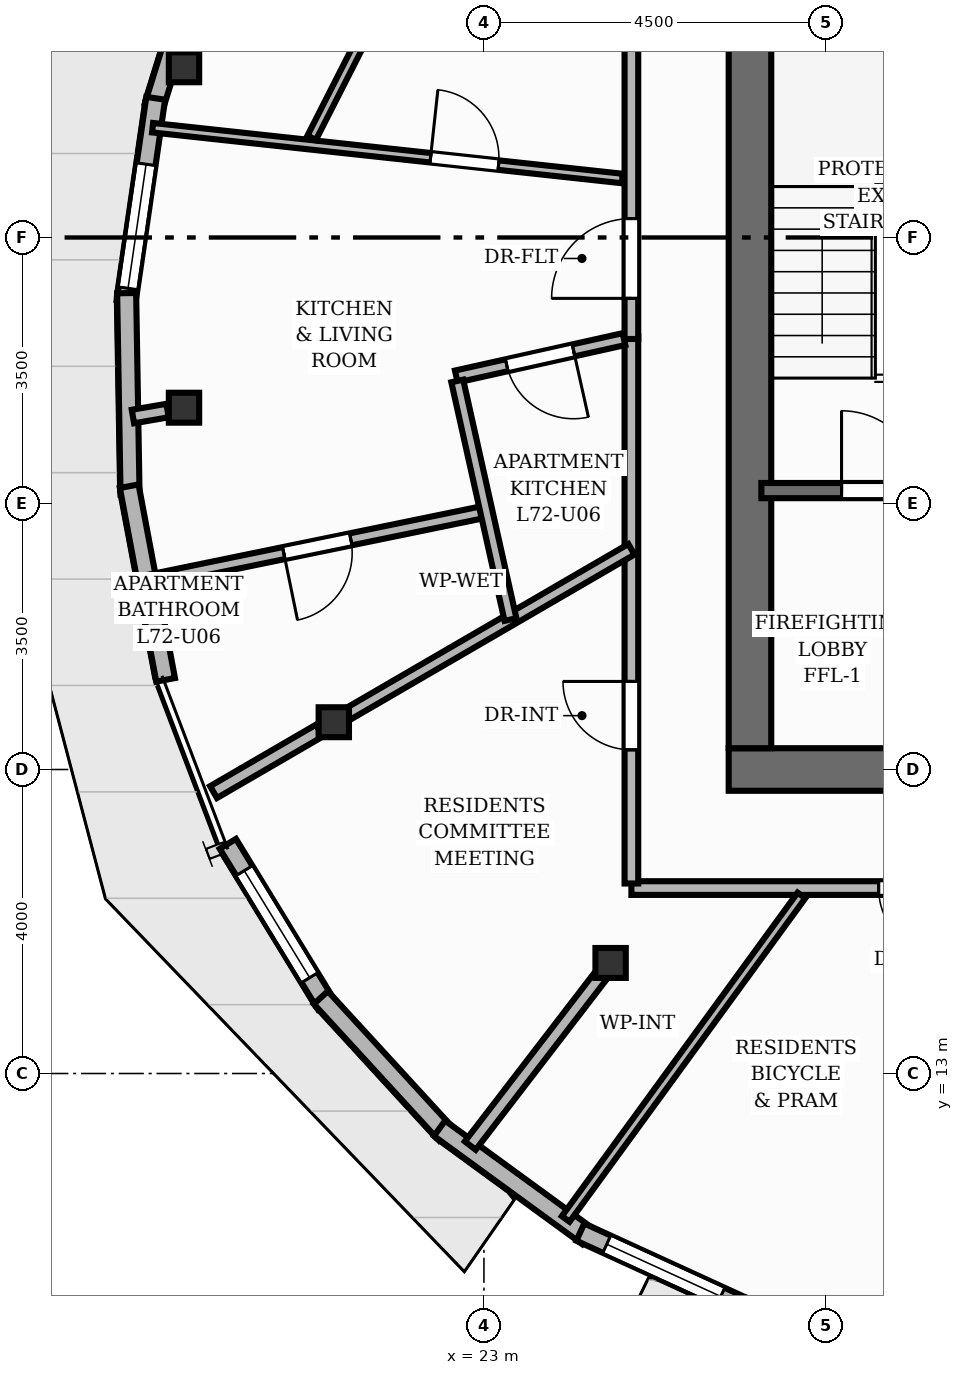
"""IFC4 building model, lengths in metres.
Left out: names, types, materials, properties, quantities, classifications, styles, units other than length and angle.
Written with IfcOpenShell. Run it as: python <this file> out.ifc"""

import sys

from ifc_helpers import new_model, si_unit, direction, frame, frame_2d, origin, origin_2d, place, context, subcontext, project, spatial, rectangle, i_section, extrude, element, fill, save


model = new_model("IFC4")
c1 = context("Model", 3, precision=1e-05, world=origin(), true_north=direction((0.0, 1.0)))
c2 = subcontext(c1, "Body", "Model", "MODEL_VIEW")
j1 = project(units=[si_unit("LENGTHUNIT", "METRE"), si_unit("PLANEANGLEUNIT", "RADIAN")], contexts=[c1])
p1 = place(None, origin())
s1 = spatial("IfcSite", under=j1, at=p1, CompositionType="ELEMENT")
p2 = place(p1, origin())
s2 = spatial("IfcBuilding", under=s1, at=p2, CompositionType="ELEMENT")
p3 = place(p2, frame((0.0, 0.0, 239.84)))
s3 = spatial("IfcBuildingStorey", under=s2, at=p3, CompositionType="ELEMENT", Elevation=239.84)
p4 = place(p3, frame((26.22, 17.0, 0.0), z_axis=(0.0, 0.0, 1.0), x_axis=(1.0, 0.0, 0.0)))
e1 = element("IfcWall", 1, at=p4, inside=s3, PredefinedType="SHEAR", context=c2, shape_type="SweptSolid", body=[
    extrude(rectangle(XDim=11.56, YDim=0.56, at=frame_2d((5.78, 0.0))), origin(), (0.0, 0.0, 1.0), 3.2),
])
p5 = place(p4, frame((2.28, 0.0, 0.0)))
e2 = element("IfcOpeningElement", 2, at=p5, cuts=e1, PredefinedType="OPENING", context=c2, shape_type="SweptSolid", body=[
    extrude(rectangle(XDim=1.1, YDim=2.15, at=frame_2d((0.55, 1.075))), frame((0.0, 0.29, 0.0), z_axis=(0.0, -1.0, 0.0), x_axis=(1.0, 0.0, 0.0)), (0.0, 0.0, 1.0), 0.58),
])
p6 = place(p4, frame((5.83, 0.0, 0.0)))
e3 = element("IfcOpeningElement", 3, at=p6, cuts=e1, PredefinedType="OPENING", context=c2, shape_type="SweptSolid", body=[
    extrude(rectangle(XDim=0.9, YDim=2.1, at=frame_2d((0.45, 1.05))), frame((0.0, 0.29, 0.0), z_axis=(0.0, -1.0, 0.0), x_axis=(1.0, 0.0, 0.0)), (0.0, 0.0, 1.0), 0.58),
])
p7 = place(p3, frame((26.5, 17.28, 0.0), z_axis=(0.0, 0.0, 1.0), x_axis=(0.0, 1.0, 0.0)))
e4 = element("IfcWall", 4, at=p7, inside=s3, PredefinedType="SHEAR", context=c2, shape_type="SweptSolid", body=[
    extrude(rectangle(XDim=13.44, YDim=0.56, at=frame_2d((6.72, 0.0))), origin(), (0.0, 0.0, 1.0), 3.2),
])
for number, where, z_axis, x_axis in (
    (5, (19.054, 26.24, 0.0), (0.0, 0.0, 1.0), (1.0, 0.0, 0.0)),
    (6, (19.054, 21.76, 0.0), (0.0, 0.0, 1.0), (1.0, 0.0, 0.0)),
    (7, (21.025, 17.622, 0.0), (0.0, 0.0, 1.0), (1.0, 0.0, 0.0)),
    (8, (24.667, 14.455, 0.0), (0.0, 0.0, 1.0), (1.0, 0.0, 0.0)),
):
    element("IfcColumn", number, at=place(p3, frame(where, z_axis=z_axis, x_axis=x_axis)), inside=s3, PredefinedType="COLUMN", context=c2, shape_type="SweptSolid", body=[
        extrude(i_section(OverallWidth=0.399, OverallDepth=0.394, WebThickness=0.023, FlangeThickness=0.037, at=origin_2d()), origin(), (0.0, 0.0, 1.0), 3.2),
    ])
p8 = place(p3, frame((18.657, 25.725, 0.0), z_axis=(0.0, 0.0, 1.0), x_axis=(0.29642164717, 0.955057174775, 0.0)))
e9 = element("IfcWall", 9, at=p8, inside=s3, PredefinedType="SOLIDWALL", context=c2, shape_type="SweptSolid", body=[
    extrude(rectangle(XDim=2.739, YDim=0.25, at=frame_2d((1.369, 0.0))), origin(), (0.0, 0.0, 1.0), 2.497),
])
p9 = place(p3, frame((18.292, 23.158, 0.0), z_axis=(0.0, 0.0, 1.0), x_axis=(0.144229466115, 0.989544269401, 0.0)))
e10 = element("IfcWall", 10, at=p9, inside=s3, PredefinedType="SOLIDWALL", context=c2, shape_type="SweptSolid", body=[
    extrude(rectangle(XDim=2.702, YDim=0.25, at=frame_2d((1.351, 0.0))), origin(), (0.0, 0.0, 1.0), 2.497),
])
p10 = place(p9, frame((0.175, 0.0, 0.85)))
e11 = element("IfcOpeningElement", 11, at=p10, cuts=e10, PredefinedType="OPENING", context=c2, shape_type="SweptSolid", body=[
    extrude(rectangle(XDim=1.65, YDim=1.55, at=frame_2d((0.825, 0.775))), frame((0.0, 0.135, 0.0), z_axis=(0.0, -1.0, 0.0), x_axis=(1.0, 0.0, 0.0)), (0.0, 0.0, 1.0), 0.27),
])
p11 = place(p3, frame((18.344, 20.617, 0.0), z_axis=(0.0, 0.0, 1.0), x_axis=(-0.016945158089, 0.999856420501, 0.0)))
e12 = element("IfcWall", 12, at=p11, inside=s3, PredefinedType="SOLIDWALL", context=c2, shape_type="SweptSolid", body=[
    extrude(rectangle(XDim=2.651, YDim=0.25, at=frame_2d((1.326, 0.0))), origin(), (0.0, 0.0, 1.0), 2.88),
])
p12 = place(p3, frame((18.812, 18.18, 0.0), z_axis=(0.0, 0.0, 1.0), x_axis=(-0.184783228791, 0.982779302976, 0.0)))
e13 = element("IfcWall", 13, at=p12, inside=s3, PredefinedType="SOLIDWALL", context=c2, shape_type="SweptSolid", body=[
    extrude(rectangle(XDim=2.592, YDim=0.25, at=frame_2d((1.296, 0.0))), origin(), (0.0, 0.0, 1.0), 2.88),
])
p13 = place(p3, frame((20.923, 13.907, 0.0), z_axis=(0.0, 0.0, 1.0), x_axis=(-0.52150580366, 0.853247734687, 0.0)))
e14 = element("IfcWall", 14, at=p13, inside=s3, PredefinedType="SOLIDWALL", context=c2, shape_type="SweptSolid", body=[
    extrude(rectangle(XDim=2.478, YDim=0.25, at=frame_2d((1.239, 0.0))), origin(), (0.0, 0.0, 1.0), 2.88),
])
p14 = place(p13, frame((0.414, 0.0, 0.85)))
e15 = element("IfcOpeningElement", 15, at=p14, cuts=e14, PredefinedType="OPENING", context=c2, shape_type="SweptSolid", body=[
    extrude(rectangle(XDim=1.65, YDim=1.55, at=frame_2d((0.825, 0.775))), frame((0.0, 0.135, 0.0), z_axis=(0.0, -1.0, 0.0), x_axis=(1.0, 0.0, 0.0)), (0.0, 0.0, 1.0), 0.27),
])
p15 = place(p3, frame((22.501, 12.202, 0.0), z_axis=(0.0, 0.0, 1.0), x_axis=(-0.675783606308, 0.737100072884, 0.0)))
e16 = element("IfcWall", 16, at=p15, inside=s3, PredefinedType="SOLIDWALL", context=c2, shape_type="SweptSolid", body=[
    extrude(rectangle(XDim=2.437, YDim=0.25, at=frame_2d((1.218, 0.0))), origin(), (0.0, 0.0, 1.0), 2.88),
])
p16 = place(p3, frame((24.367, 10.855, 0.0), z_axis=(0.0, 0.0, 1.0), x_axis=(-0.80791325233, 0.589301431111, 0.0)))
e17 = element("IfcWall", 17, at=p16, inside=s3, PredefinedType="SOLIDWALL", context=c2, shape_type="SweptSolid", body=[
    extrude(rectangle(XDim=2.415, YDim=0.25, at=frame_2d((1.207, 0.0))), origin(), (0.0, 0.0, 1.0), 2.88),
])
p17 = place(p3, frame((26.463, 9.907, 0.0), z_axis=(0.0, 0.0, 1.0), x_axis=(-0.909098330543, 0.416581595133, 0.0)))
e18 = element("IfcWall", 18, at=p17, inside=s3, PredefinedType="SOLIDWALL", context=c2, shape_type="SweptSolid", body=[
    extrude(rectangle(XDim=2.415, YDim=0.25, at=frame_2d((1.207, 0.0))), origin(), (0.0, 0.0, 1.0), 2.88),
])
p18 = place(p17, frame((0.382, 0.0, 0.85)))
e19 = element("IfcOpeningElement", 19, at=p18, cuts=e18, PredefinedType="OPENING", context=c2, shape_type="SweptSolid", body=[
    extrude(rectangle(XDim=1.65, YDim=1.55, at=frame_2d((0.825, 0.775))), frame((0.0, 0.135, 0.0), z_axis=(0.0, -1.0, 0.0), x_axis=(1.0, 0.0, 0.0)), (0.0, 0.0, 1.0), 0.27),
])
p19 = place(p3, frame((26.65, 20.67, 0.0), z_axis=(0.0, 0.0, 1.0), x_axis=(1.0, 0.0, 0.0)))
e20 = element("IfcWall", 20, at=p19, inside=s3, PredefinedType="SHEAR", context=c2, shape_type="SweptSolid", body=[
    extrude(rectangle(XDim=3.24, YDim=0.2, at=frame_2d((1.62, 0.0))), origin(), (0.0, 0.0, 1.0), 3.2),
])
p20 = place(p19, frame((1.055, 0.0, 0.0)))
e21 = element("IfcOpeningElement", 21, at=p20, cuts=e20, PredefinedType="OPENING", context=c2, shape_type="SweptSolid", body=[
    extrude(rectangle(XDim=1.05, YDim=2.15, at=frame_2d((0.525, 1.075))), frame((0.0, 0.11, 0.0), z_axis=(0.0, -1.0, 0.0), x_axis=(1.0, 0.0, 0.0)), (0.0, 0.0, 1.0), 0.22),
])
p21 = place(p3, frame((18.837, 21.723, 0.0), z_axis=(0.0, 0.0, 1.0), x_axis=(-0.985450971837, -0.169959942652, 0.0)))
e22 = element("IfcWall", 22, at=p21, inside=s3, PredefinedType="PARTITIONING", context=c2, shape_type="SweptSolid", body=[
    extrude(rectangle(XDim=0.463, YDim=0.18, at=frame_2d((0.231, 0.0))), origin(), (0.0, 0.0, 1.0), 2.323),
])
p22 = place(p3, frame((20.835, 17.512, 0.0), z_axis=(0.0, 0.0, 1.0), x_axis=(-0.864591417654, -0.50247555216, 0.0)))
e23 = element("IfcWall", 23, at=p22, inside=s3, PredefinedType="PARTITIONING", context=c2, shape_type="SweptSolid", body=[
    extrude(rectangle(XDim=1.611, YDim=0.18, at=frame_2d((0.805, 0.0))), origin(), (0.0, 0.0, 1.0), 2.323),
])
p23 = place(p3, frame((24.533, 14.281, 0.0), z_axis=(0.0, 0.0, 1.0), x_axis=(-0.609215330611, -0.793004842954, 0.0)))
e24 = element("IfcWall", 24, at=p23, inside=s3, PredefinedType="PARTITIONING", context=c2, shape_type="SweptSolid", body=[
    extrude(rectangle(XDim=2.811, YDim=0.18, at=frame_2d((1.405, 0.0))), origin(), (0.0, 0.0, 1.0), 2.323),
])
p24 = place(p3, frame((33.428, 15.44, 0.0), z_axis=(0.0, 0.0, 1.0), x_axis=(-1.0, 0.0, 0.0)))
e25 = element("IfcWall", 25, at=p24, inside=s3, PredefinedType="PARTITIONING", context=c2, shape_type="SweptSolid", body=[
    extrude(rectangle(XDim=8.489, YDim=0.18, at=frame_2d((4.244, 0.0))), origin(), (0.0, 0.0, 1.0), 2.875),
])
p25 = place(p24, frame((4.336, 0.0, 0.0)))
e26 = element("IfcOpeningElement", 26, at=p25, cuts=e25, PredefinedType="OPENING", context=c2, shape_type="SweptSolid", body=[
    extrude(rectangle(XDim=0.9, YDim=2.1, at=frame_2d((0.45, 1.05))), frame((0.0, 0.1, 0.0), z_axis=(0.0, -1.0, 0.0), x_axis=(1.0, 0.0, 0.0)), (0.0, 0.0, 1.0), 0.2),
])
p26 = place(p3, frame((24.94, 15.5, 0.0), z_axis=(0.0, 0.0, 1.0), x_axis=(0.0, 1.0, 0.0)))
e27 = element("IfcWall", 27, at=p26, inside=s3, PredefinedType="PARTITIONING", context=c2, shape_type="SweptSolid", body=[
    extrude(rectangle(XDim=7.203, YDim=0.18, at=frame_2d((3.602, 0.0))), origin(), (0.0, 0.0, 1.0), 2.875),
])
p27 = place(p26, frame((1.759, 0.0, 0.0)))
e28 = element("IfcOpeningElement", 28, at=p27, cuts=e27, PredefinedType="OPENING", context=c2, shape_type="SweptSolid", body=[
    extrude(rectangle(XDim=0.9, YDim=2.1, at=frame_2d((0.45, 1.05))), frame((0.0, 0.1, 0.0), z_axis=(0.0, -1.0, 0.0), x_axis=(1.0, 0.0, 0.0)), (0.0, 0.0, 1.0), 0.2),
])
p28 = place(p3, frame((24.94, 22.664, 0.0), z_axis=(0.0, 0.0, 1.0), x_axis=(0.0, 1.0, 0.0)))
e29 = element("IfcWall", 29, at=p28, inside=s3, PredefinedType="PARTITIONING", context=c2, shape_type="SweptSolid", body=[
    extrude(rectangle(XDim=9.896, YDim=0.18, at=frame_2d((4.948, 0.0))), origin(), (0.0, 0.0, 1.0), 2.875),
])
p29 = place(p28, frame((0.535, 0.0, 0.0)))
e30 = element("IfcOpeningElement", 30, at=p29, cuts=e29, PredefinedType="OPENING", context=c2, shape_type="SweptSolid", body=[
    extrude(rectangle(XDim=1.05, YDim=2.15, at=frame_2d((0.525, 1.075))), frame((0.0, 0.1, 0.0), z_axis=(0.0, -1.0, 0.0), x_axis=(1.0, 0.0, 0.0)), (0.0, 0.0, 1.0), 0.2),
])
p30 = place(p3, frame((24.076, 11.086, 0.0), z_axis=(0.0, 0.0, 1.0), x_axis=(0.588877051888, 0.808222628834, 0.0)))
e31 = element("IfcWall", 31, at=p30, inside=s3, PredefinedType="PARTITIONING", context=c2, shape_type="SweptSolid", body=[
    extrude(rectangle(XDim=5.267, YDim=0.125, at=frame_2d((2.633, 0.0))), origin(), (0.0, 0.0, 1.0), 2.612),
])
p31 = place(p3, frame((21.21, 17.729, 0.0), z_axis=(0.0, 0.0, 1.0), x_axis=(0.864584371019, 0.502487676854, 0.0)))
e32 = element("IfcWall", 32, at=p31, inside=s3, PredefinedType="PLUMBINGWALL", context=c2, shape_type="SweptSolid", body=[
    extrude(rectangle(XDim=4.314, YDim=0.16, at=frame_2d((2.157, 0.0))), origin(), (0.0, 0.0, 1.0), 2.323),
])
p32 = place(p3, frame((23.032, 20.395, 0.0), z_axis=(0.0, 0.0, 1.0), x_axis=(-0.979533467042, -0.201281362638, 0.0)))
e33 = element("IfcWall", 33, at=p32, inside=s3, PredefinedType="PLUMBINGWALL", context=c2, shape_type="SweptSolid", body=[
    extrude(rectangle(XDim=4.542, YDim=0.16, at=frame_2d((2.271, 0.0))), origin(), (0.0, 0.0, 1.0), 2.612),
])
p33 = place(p32, frame((1.821, 0.0, 0.0)))
e34 = element("IfcOpeningElement", 34, at=p33, cuts=e33, PredefinedType="OPENING", context=c2, shape_type="SweptSolid", body=[
    extrude(rectangle(XDim=0.9, YDim=2.1, at=frame_2d((0.45, 1.05))), frame((0.0, 0.09, 0.0), z_axis=(0.0, -1.0, 0.0), x_axis=(1.0, 0.0, 0.0)), (0.0, 0.0, 1.0), 0.18),
])
p34 = place(p3, frame((18.64, 25.445, 0.0), z_axis=(0.0, 0.0, 1.0), x_axis=(0.994206026696, -0.107491285604, 0.0)))
e35 = element("IfcWall", 35, at=p34, inside=s3, PredefinedType="PARTITIONING", context=c2, shape_type="SweptSolid", body=[
    extrude(rectangle(XDim=6.217, YDim=0.125, at=frame_2d((3.108, 0.0))), origin(), (0.0, 0.0, 1.0), 2.875),
])
p35 = place(p34, frame((3.678, 0.0, 0.0)))
e36 = element("IfcOpeningElement", 36, at=p35, cuts=e35, PredefinedType="OPENING", context=c2, shape_type="SweptSolid", body=[
    extrude(rectangle(XDim=0.9, YDim=2.1, at=frame_2d((0.45, 1.05))), frame((0.0, 0.073, 0.0), z_axis=(0.0, -1.0, 0.0), x_axis=(1.0, 0.0, 0.0)), (0.0, 0.0, 1.0), 0.145),
])
p36 = place(p3, frame((24.842, 22.663, 0.0), z_axis=(0.0, 0.0, 1.0), x_axis=(-0.976008847289, -0.21773086601, 0.0)))
e37 = element("IfcWall", 37, at=p36, inside=s3, PredefinedType="PLUMBINGWALL", context=c2, shape_type="SweptSolid", body=[
    extrude(rectangle(XDim=2.26, YDim=0.16, at=frame_2d((1.13, 0.0))), origin(), (0.0, 0.0, 1.0), 2.323),
])
p37 = place(p36, frame((0.68, 0.0, 0.0)))
e38 = element("IfcOpeningElement", 38, at=p37, cuts=e37, PredefinedType="OPENING", context=c2, shape_type="SweptSolid", body=[
    extrude(rectangle(XDim=0.9, YDim=2.1, at=frame_2d((0.45, 1.05))), frame((0.0, 0.09, 0.0), z_axis=(0.0, -1.0, 0.0), x_axis=(1.0, 0.0, 0.0)), (0.0, 0.0, 1.0), 0.18),
])
p38 = place(p3, frame((22.649, 22.112, 0.0), z_axis=(0.0, 0.0, 1.0), x_axis=(0.21761353054, -0.97603501542, 0.0)))
e39 = element("IfcWall", 39, at=p38, inside=s3, PredefinedType="PLUMBINGWALL", context=c2, shape_type="SweptSolid", body=[
    extrude(rectangle(XDim=3.217, YDim=0.16, at=frame_2d((1.608, 0.0))), origin(), (0.0, 0.0, 1.0), 2.875),
])
p39 = place(p3, frame((20.734, 25.312, 0.0), z_axis=(0.0, 0.0, 1.0), x_axis=(0.45353588766, 0.891238014564, 0.0)))
e40 = element("IfcWall", 40, at=p39, inside=s3, PredefinedType="PARTITIONING", context=c2, shape_type="SweptSolid", body=[
    extrude(rectangle(XDim=8.912, YDim=0.125, at=frame_2d((4.456, 0.0))), origin(), (0.0, 0.0, 1.0), 2.875),
])
p40 = place(p39, frame((4.006, 0.0, 0.0)))
e41 = element("IfcOpeningElement", 41, at=p40, cuts=e40, PredefinedType="OPENING", context=c2, shape_type="SweptSolid", body=[
    extrude(rectangle(XDim=0.9, YDim=2.1, at=frame_2d((0.45, 1.05))), frame((0.0, 0.073, 0.0), z_axis=(0.0, -1.0, 0.0), x_axis=(1.0, 0.0, 0.0)), (0.0, 0.0, 1.0), 0.145),
])
p41 = place(p10, origin())
e42 = element("IfcWindow", 42, at=p41, inside=s3, PartitioningType="SINGLE_PANEL", PredefinedType="WINDOW", context=c2, shape_type="SweptSolid", body=[
    extrude(rectangle(XDim=1.65, YDim=1.55, at=frame_2d((0.825, 0.775))), frame((0.0, 0.03, 0.0), z_axis=(0.0, -1.0, 0.0), x_axis=(1.0, 0.0, 0.0)), (0.0, 0.0, 1.0), 0.06),
])
fill(e11, e42)
p42 = place(p14, origin())
e43 = element("IfcWindow", 43, at=p42, inside=s3, PartitioningType="SINGLE_PANEL", PredefinedType="WINDOW", context=c2, shape_type="SweptSolid", body=[
    extrude(rectangle(XDim=1.65, YDim=1.55, at=frame_2d((0.825, 0.775))), frame((0.0, 0.03, 0.0), z_axis=(0.0, -1.0, 0.0), x_axis=(1.0, 0.0, 0.0)), (0.0, 0.0, 1.0), 0.06),
])
fill(e15, e43)
p43 = place(p18, origin())
e44 = element("IfcWindow", 44, at=p43, inside=s3, PartitioningType="SINGLE_PANEL", PredefinedType="WINDOW", context=c2, shape_type="SweptSolid", body=[
    extrude(rectangle(XDim=1.65, YDim=1.55, at=frame_2d((0.825, 0.775))), frame((0.0, 0.03, 0.0), z_axis=(0.0, -1.0, 0.0), x_axis=(1.0, 0.0, 0.0)), (0.0, 0.0, 1.0), 0.06),
])
fill(e19, e44)
p44 = place(p20, origin())
e45 = element("IfcDoor", 45, at=p44, inside=s3, OperationType="SINGLE_SWING_LEFT", PredefinedType="DOOR", context=c2, shape_type="SweptSolid", body=[
    extrude(rectangle(XDim=1.05, YDim=2.15, at=frame_2d((0.525, 1.075))), frame((0.0, 0.025, 0.0), z_axis=(0.0, -1.0, 0.0), x_axis=(1.0, 0.0, 0.0)), (0.0, 0.0, 1.0), 0.05),
])
fill(e21, e45)
p45 = place(p25, origin())
e46 = element("IfcDoor", 46, at=p45, inside=s3, OperationType="SINGLE_SWING_LEFT", PredefinedType="DOOR", context=c2, shape_type="SweptSolid", body=[
    extrude(rectangle(XDim=0.9, YDim=2.1, at=frame_2d((0.45, 1.05))), frame((0.0, 0.025, 0.0), z_axis=(0.0, -1.0, 0.0), x_axis=(1.0, 0.0, 0.0)), (0.0, 0.0, 1.0), 0.05),
])
fill(e26, e46)
p46 = place(p27, origin())
e47 = element("IfcDoor", 47, at=p46, inside=s3, OperationType="SINGLE_SWING_RIGHT", PredefinedType="DOOR", context=c2, shape_type="SweptSolid", body=[
    extrude(rectangle(XDim=0.9, YDim=2.1, at=frame_2d((0.45, 1.05))), frame((0.0, 0.025, 0.0), z_axis=(0.0, -1.0, 0.0), x_axis=(1.0, 0.0, 0.0)), (0.0, 0.0, 1.0), 0.05),
])
fill(e28, e47)
p47 = place(p29, origin())
e48 = element("IfcDoor", 48, at=p47, inside=s3, OperationType="SINGLE_SWING_LEFT", PredefinedType="DOOR", context=c2, shape_type="SweptSolid", body=[
    extrude(rectangle(XDim=1.05, YDim=2.15, at=frame_2d((0.525, 1.075))), frame((0.0, 0.025, 0.0), z_axis=(0.0, -1.0, 0.0), x_axis=(1.0, 0.0, 0.0)), (0.0, 0.0, 1.0), 0.05),
])
fill(e30, e48)
p48 = place(p33, origin())
e49 = element("IfcDoor", 49, at=p48, inside=s3, OperationType="SINGLE_SWING_RIGHT", PredefinedType="DOOR", context=c2, shape_type="SweptSolid", body=[
    extrude(rectangle(XDim=0.9, YDim=2.1, at=frame_2d((0.45, 1.05))), frame((0.0, 0.025, 0.0), z_axis=(0.0, -1.0, 0.0), x_axis=(1.0, 0.0, 0.0)), (0.0, 0.0, 1.0), 0.05),
])
fill(e34, e49)
p49 = place(p35, origin())
e50 = element("IfcDoor", 50, at=p49, inside=s3, OperationType="SINGLE_SWING_LEFT", PredefinedType="DOOR", context=c2, shape_type="SweptSolid", body=[
    extrude(rectangle(XDim=0.9, YDim=2.1, at=frame_2d((0.45, 1.05))), frame((0.0, 0.025, 0.0), z_axis=(0.0, -1.0, 0.0), x_axis=(1.0, 0.0, 0.0)), (0.0, 0.0, 1.0), 0.05),
])
fill(e36, e50)
p50 = place(p37, origin())
e51 = element("IfcDoor", 51, at=p50, inside=s3, OperationType="SINGLE_SWING_LEFT", PredefinedType="DOOR", context=c2, shape_type="SweptSolid", body=[
    extrude(rectangle(XDim=0.9, YDim=2.1, at=frame_2d((0.45, 1.05))), frame((0.0, 0.025, 0.0), z_axis=(0.0, -1.0, 0.0), x_axis=(1.0, 0.0, 0.0)), (0.0, 0.0, 1.0), 0.05),
])
fill(e38, e51)
save(model, sys.argv[1])
